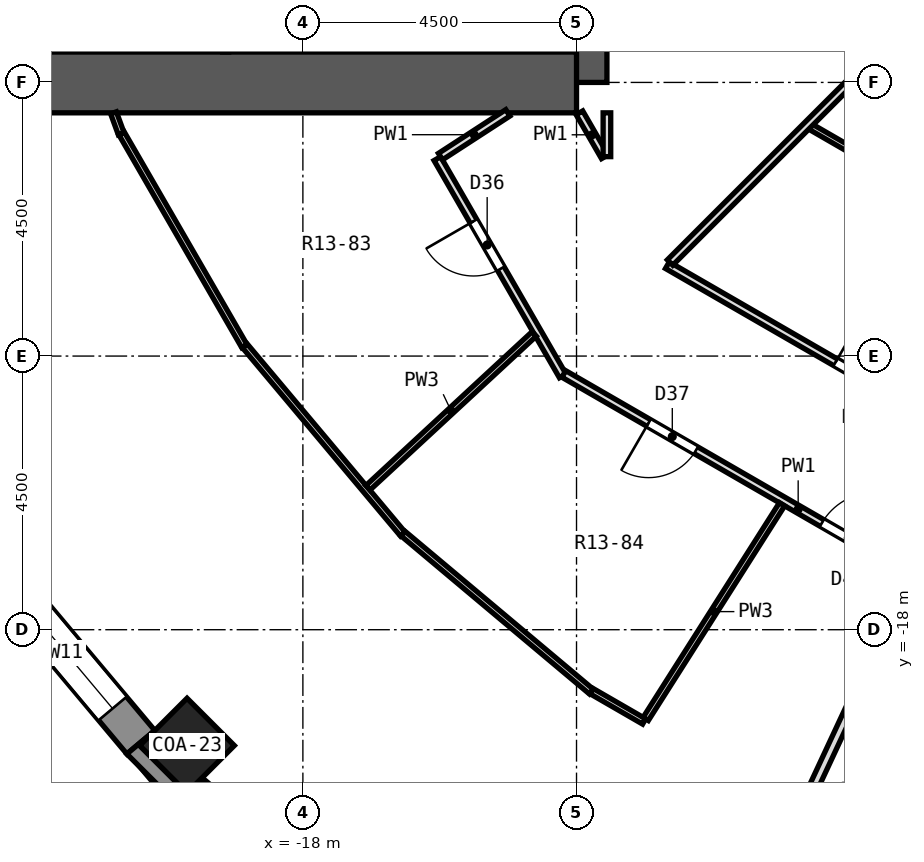
"""IFC4 building model, lengths in metres.
Left out: names, types, materials, properties, quantities, classifications, styles, units other than length and angle.
Written with IfcOpenShell. Run it as: python <this file> out.ifc"""

import sys

from ifc_helpers import new_model, si_unit, direction, frame, frame_2d, origin, origin_2d, place, context, subcontext, project, spatial, polyline, rectangle, outline, extrude, element, fill, save


model = new_model("IFC4")
c1 = context("Model", 3, precision=1e-05, world=origin(), true_north=direction((0.0, 1.0)))
c2 = subcontext(c1, "Body", "Model", "MODEL_VIEW")
j1 = project(units=[si_unit("LENGTHUNIT", "METRE"), si_unit("PLANEANGLEUNIT", "RADIAN")], contexts=[c1])
p1 = place(None, origin())
s1 = spatial("IfcSite", under=j1, at=p1, CompositionType="ELEMENT")
p2 = place(p1, origin())
s2 = spatial("IfcBuilding", under=s1, at=p2, CompositionType="ELEMENT")
p3 = place(p2, frame((0.0, 0.0, 65.9)))
s3 = spatial("IfcBuildingStorey", under=s2, at=p3, CompositionType="ELEMENT", Elevation=65.9)
p4 = place(p3, frame((-19.905, -19.905, 0.0), z_axis=(0.0, 0.0, 1.0), x_axis=(-0.707106781187, -0.707106781187, 0.0)))
e1 = element("IfcColumn", 1, at=p4, inside=s3, PredefinedType="COLUMN", context=c2, shape_type="SweptSolid", body=[
    extrude(rectangle(XDim=1.1, YDim=1.1, at=origin_2d()), origin(), (0.0, 0.0, 1.0), 3.3),
])
p5 = place(p3, frame((-13.5, -9.0, 0.0), z_axis=(0.0, 0.0, 1.0), x_axis=(0.0, 1.0, 0.0)))
e2 = element("IfcWall", 2, at=p5, inside=s3, PredefinedType="SHEAR", context=c2, shape_type="SweptSolid", body=[
    extrude(rectangle(XDim=18.0, YDim=1.0, at=frame_2d((9.0, 0.0))), origin(), (0.0, 0.0, 1.0), 3.3),
])
p6 = place(p5, frame((15.4, 0.0, 0.0)))
e3 = element("IfcOpeningElement", 3, at=p6, cuts=e2, PredefinedType="OPENING", context=c2, shape_type="SweptSolid", body=[
    extrude(rectangle(XDim=1.2, YDim=2.1, at=frame_2d((0.6, 1.05))), frame((0.0, 0.512, 0.0), z_axis=(0.0, -1.0, 0.0), x_axis=(1.0, 0.0, 0.0)), (0.0, 0.0, 1.0), 1.024),
])
p7 = place(p5, frame((1.4, 0.0, 0.0)))
e4 = element("IfcOpeningElement", 4, at=p7, cuts=e2, PredefinedType="OPENING", context=c2, shape_type="SweptSolid", body=[
    extrude(rectangle(XDim=1.2, YDim=2.1, at=frame_2d((0.6, 1.05))), frame((0.0, 0.512, 0.0), z_axis=(0.0, -1.0, 0.0), x_axis=(1.0, 0.0, 0.0)), (0.0, 0.0, 1.0), 1.024),
])
p8 = place(p5, frame((7.5, 0.0, 0.0)))
e5 = element("IfcOpeningElement", 5, at=p8, cuts=e2, PredefinedType="OPENING", context=c2, shape_type="SweptSolid", body=[
    extrude(rectangle(XDim=3.0, YDim=2.4, at=frame_2d((1.5, 1.2))), frame((0.0, 0.512, 0.0), z_axis=(0.0, -1.0, 0.0), x_axis=(1.0, 0.0, 0.0)), (0.0, 0.0, 1.0), 1.024),
])
p9 = place(p3, frame((-13.5, -9.0, 0.0), z_axis=(0.0, 0.0, 1.0), x_axis=(-1.0, 0.0, 0.0)))
e6 = element("IfcWall", 6, at=p9, inside=s3, PredefinedType="SHEAR", context=c2, shape_type="SweptSolid", body=[
    extrude(rectangle(XDim=12.4, YDim=1.0, at=frame_2d((6.2, 0.0))), origin(), (0.0, 0.0, 1.0), 3.3),
])
p10 = place(p3, frame((-23.137, -16.904, 0.0), z_axis=(0.0, 0.0, 1.0), x_axis=(0.642809392687, -0.766026164483, 0.0)))
e7 = element("IfcWall", 7, at=p10, inside=s3, PredefinedType="SOLIDWALL", context=c2, shape_type="SweptSolid", body=[
    extrude(rectangle(XDim=3.846, YDim=0.6, at=frame_2d((1.923, 0.0))), origin(), (0.0, 0.0, 1.0), 2.75),
])
p11 = place(p10, frame((0.723, 0.0, 0.9)))
e8 = element("IfcOpeningElement", 8, at=p11, cuts=e7, PredefinedType="OPENING", context=c2, shape_type="SweptSolid", body=[
    extrude(rectangle(XDim=2.4, YDim=1.8, at=frame_2d((1.2, 0.9))), frame((0.0, 0.312, 0.0), z_axis=(0.0, -1.0, 0.0), x_axis=(1.0, 0.0, 0.0)), (0.0, 0.0, 1.0), 0.624),
])
p12 = place(p3, frame((-19.85, -20.665, 0.0), z_axis=(0.0, 0.0, 1.0), x_axis=(0.766026164483, -0.642809392687, 0.0)))
e9 = element("IfcWall", 9, at=p12, inside=s3, PredefinedType="SOLIDWALL", context=c2, shape_type="SweptSolid", body=[
    extrude(rectangle(XDim=3.846, YDim=0.6, at=frame_2d((1.923, 0.0))), origin(), (0.0, 0.0, 1.0), 2.75),
])
p13 = place(p12, frame((0.723, 0.0, 0.9)))
e10 = element("IfcOpeningElement", 10, at=p13, cuts=e9, PredefinedType="OPENING", context=c2, shape_type="SweptSolid", body=[
    extrude(rectangle(XDim=2.4, YDim=1.8, at=frame_2d((1.2, 0.9))), frame((0.0, 0.312, 0.0), z_axis=(0.0, -1.0, 0.0), x_axis=(1.0, 0.0, 0.0)), (0.0, 0.0, 1.0), 0.624),
])
p14 = place(p3, origin())
e11 = element("IfcWall", 11, at=p14, inside=s3, PredefinedType="SOLIDWALL", context=c2, shape_type="SweptSolid", body=[
    extrude(outline(polyline([(-20.043, -20.895), (-19.657, -20.435), (-19.905, -20.683), (-20.683, -19.905), (-20.435, -19.657), (-20.895, -20.043), (-20.043, -20.895)])), origin(), (0.0, 0.0, 1.0), 2.75),
])
p15 = place(p3, frame((-21.114, -9.5, 0.0), z_axis=(0.0, 0.0, 1.0), x_axis=(0.34403955715, -0.938955155008, 0.0)))
e12 = element("IfcWall", 12, at=p15, inside=s3, PredefinedType="PARTITIONING", context=c2, shape_type="SweptSolid", body=[
    extrude(rectangle(XDim=0.367, YDim=0.1, at=frame_2d((0.184, 0.0))), origin(), (0.0, 0.0, 1.0), 2.75),
])
p16 = place(p3, frame((-20.98, -9.84, 0.0), z_axis=(0.0, 0.0, 1.0), x_axis=(0.500013722509, -0.866017480945, 0.0)))
e13 = element("IfcWall", 13, at=p16, inside=s3, PredefinedType="PARTITIONING", context=c2, shape_type="SweptSolid", body=[
    extrude(rectangle(XDim=4.039, YDim=0.1, at=frame_2d((2.02, 0.0))), origin(), (0.0, 0.0, 1.0), 2.75),
])
p17 = place(p3, frame((-15.789, -10.253, 0.0), z_axis=(0.0, 0.0, 1.0), x_axis=(0.49993934159, -0.866060422101, 0.0)))
e14 = element("IfcWall", 14, at=p17, inside=s3, PredefinedType="PARTITIONING", context=c2, shape_type="SweptSolid", body=[
    extrude(rectangle(XDim=4.125, YDim=0.125, at=frame_2d((2.062, 0.0))), origin(), (0.0, 0.0, 1.0), 2.75),
])
p18 = place(p17, frame((1.189, 0.0, 0.0)))
e15 = element("IfcOpeningElement", 15, at=p18, cuts=e14, PredefinedType="OPENING", context=c2, shape_type="SweptSolid", body=[
    extrude(rectangle(XDim=0.9, YDim=2.1, at=frame_2d((0.45, 1.05))), frame((0.0, 0.074, 0.0), z_axis=(0.0, -1.0, 0.0), x_axis=(1.0, 0.0, 0.0)), (0.0, 0.0, 1.0), 0.149),
])
p19 = place(p3, frame((-13.452, -9.5, 0.0), z_axis=(0.0, 0.0, 1.0), x_axis=(0.49991670217, -0.866073490468, 0.0)))
e16 = element("IfcWall", 16, at=p19, inside=s3, PredefinedType="PARTITIONING", context=c2, shape_type="SweptSolid", body=[
    extrude(rectangle(XDim=0.834, YDim=0.125, at=frame_2d((0.417, 0.0))), origin(), (0.0, 0.0, 1.0), 2.75),
])
p20 = place(p3, frame((-18.954, -13.332, 0.0), z_axis=(0.0, 0.0, 1.0), x_axis=(0.642759837919, -0.766067745541, 0.0)))
e17 = element("IfcWall", 17, at=p20, inside=s3, PredefinedType="PARTITIONING", context=c2, shape_type="SweptSolid", body=[
    extrude(rectangle(XDim=4.041, YDim=0.1, at=frame_2d((2.021, 0.0))), origin(), (0.0, 0.0, 1.0), 2.75),
])
p21 = place(p3, frame((-16.351, -16.421, 0.0), z_axis=(0.0, 0.0, 1.0), x_axis=(0.766042783762, -0.642789587226, 0.0)))
e18 = element("IfcWall", 18, at=p21, inside=s3, PredefinedType="PARTITIONING", context=c2, shape_type="SweptSolid", body=[
    extrude(rectangle(XDim=4.041, YDim=0.1, at=frame_2d((2.021, 0.0))), origin(), (0.0, 0.0, 1.0), 2.75),
])
p22 = place(p3, frame((-13.251, -19.011, 0.0), z_axis=(0.0, 0.0, 1.0), x_axis=(0.866063163075, -0.499934593286, 0.0)))
e19 = element("IfcWall", 19, at=p22, inside=s3, PredefinedType="PARTITIONING", context=c2, shape_type="SweptSolid", body=[
    extrude(rectangle(XDim=0.996, YDim=0.1, at=frame_2d((0.498, 0.0))), origin(), (0.0, 0.0, 1.0), 2.75),
])
p23 = place(p3, frame((-13.709, -13.794, 0.0), z_axis=(0.0, 0.0, 1.0), x_axis=(0.866059817553, -0.499940388867, 0.0)))
e20 = element("IfcWall", 20, at=p23, inside=s3, PredefinedType="PARTITIONING", context=c2, shape_type="SweptSolid", body=[
    extrude(rectangle(XDim=10.085, YDim=0.125, at=frame_2d((5.042, 0.0))), origin(), (0.0, 0.0, 1.0), 2.75),
])
p24 = place(p23, frame((1.61, 0.0, 0.0)))
e21 = element("IfcOpeningElement", 21, at=p24, cuts=e20, PredefinedType="OPENING", context=c2, shape_type="SweptSolid", body=[
    extrude(rectangle(XDim=0.9, YDim=2.1, at=frame_2d((0.45, 1.05))), frame((0.0, 0.074, 0.0), z_axis=(0.0, -1.0, 0.0), x_axis=(1.0, 0.0, 0.0)), (0.0, 0.0, 1.0), 0.149),
])
p25 = place(p23, frame((4.901, 0.0, 0.0)))
e22 = element("IfcOpeningElement", 22, at=p25, cuts=e20, PredefinedType="OPENING", context=c2, shape_type="SweptSolid", body=[
    extrude(rectangle(XDim=1.0, YDim=2.1, at=frame_2d((0.5, 1.05))), frame((0.0, 0.074, 0.0), z_axis=(0.0, -1.0, 0.0), x_axis=(1.0, 0.0, 0.0)), (0.0, 0.0, 1.0), 0.149),
])
p26 = place(p23, frame((7.816, 0.0, 0.0)))
e23 = element("IfcOpeningElement", 23, at=p26, cuts=e20, PredefinedType="OPENING", context=c2, shape_type="SweptSolid", body=[
    extrude(rectangle(XDim=1.0, YDim=2.1, at=frame_2d((0.5, 1.05))), frame((0.0, 0.074, 0.0), z_axis=(0.0, -1.0, 0.0), x_axis=(1.0, 0.0, 0.0)), (0.0, 0.0, 1.0), 0.149),
])
p27 = place(p3, frame((-12.006, -12.006, 0.0), z_axis=(0.0, 0.0, 1.0), x_axis=(0.866073188118, -0.499917225971, 0.0)))
e24 = element("IfcWall", 24, at=p27, inside=s3, PredefinedType="PARTITIONING", context=c2, shape_type="SweptSolid", body=[
    extrude(rectangle(XDim=8.861, YDim=0.125, at=frame_2d((4.431, 0.0))), origin(), (0.0, 0.0, 1.0), 2.75),
])
p28 = place(p27, frame((3.193, 0.0, 0.0)))
e25 = element("IfcOpeningElement", 25, at=p28, cuts=e24, PredefinedType="OPENING", context=c2, shape_type="SweptSolid", body=[
    extrude(rectangle(XDim=0.9, YDim=2.1, at=frame_2d((0.45, 1.05))), frame((0.0, 0.074, 0.0), z_axis=(0.0, -1.0, 0.0), x_axis=(1.0, 0.0, 0.0)), (0.0, 0.0, 1.0), 0.149),
])
p29 = place(p3, frame((-9.646, -9.731, 0.0), z_axis=(0.0, 0.0, 1.0), x_axis=(0.866059669785, -0.49994064485, 0.0)))
e26 = element("IfcWall", 26, at=p29, inside=s3, PredefinedType="PARTITIONING", context=c2, shape_type="SweptSolid", body=[
    extrude(rectangle(XDim=7.038, YDim=0.1, at=frame_2d((3.519, 0.0))), origin(), (0.0, 0.0, 1.0), 2.75),
])
p30 = place(p29, frame((3.038, 0.0, 0.0)))
e27 = element("IfcOpeningElement", 27, at=p30, cuts=e26, PredefinedType="OPENING", context=c2, shape_type="SweptSolid", body=[
    extrude(rectangle(XDim=0.9, YDim=2.1, at=frame_2d((0.45, 1.05))), frame((0.0, 0.062, 0.0), z_axis=(0.0, -1.0, 0.0), x_axis=(1.0, 0.0, 0.0)), (0.0, 0.0, 1.0), 0.124),
])
p31 = place(p3, frame((-15.737, -10.219, 0.0), z_axis=(0.0, 0.0, 1.0), x_axis=(0.838785586694, 0.544461880717, 0.0)))
e28 = element("IfcWall", 28, at=p31, inside=s3, PredefinedType="PARTITIONING", context=c2, shape_type="SweptSolid", body=[
    extrude(rectangle(XDim=1.321, YDim=0.125, at=frame_2d((0.66, 0.0))), origin(), (0.0, 0.0, 1.0), 2.75),
])
p32 = place(p3, frame((-16.93, -15.666, 0.0), z_axis=(0.0, 0.0, 1.0), x_axis=(0.733966319228, 0.679185867226, 0.0)))
e29 = element("IfcWall", 29, at=p32, inside=s3, PredefinedType="PARTITIONING", context=c2, shape_type="SweptSolid", body=[
    extrude(rectangle(XDim=3.726, YDim=0.1, at=frame_2d((1.863, 0.0))), origin(), (0.0, 0.0, 1.0), 2.75),
])
p33 = place(p3, frame((-11.962, -11.962, 0.0), z_axis=(0.0, 0.0, 1.0), x_axis=(0.707106781187, 0.707106781187, 0.0)))
e30 = element("IfcWall", 30, at=p33, inside=s3, PredefinedType="PARTITIONING", context=c2, shape_type="SweptSolid", body=[
    extrude(rectangle(XDim=7.324, YDim=0.125, at=frame_2d((3.662, 0.0))), origin(), (0.0, 0.0, 1.0), 2.75),
])
p34 = place(p3, frame((-12.361, -19.467, 0.0), z_axis=(0.0, 0.0, 1.0), x_axis=(0.535975761714, 0.844233369901, 0.0)))
e31 = element("IfcWall", 31, at=p34, inside=s3, PredefinedType="PARTITIONING", context=c2, shape_type="SweptSolid", body=[
    extrude(rectangle(XDim=4.18, YDim=0.1, at=frame_2d((2.09, 0.0))), origin(), (0.0, 0.0, 1.0), 2.75),
])
p35 = place(p3, frame((-11.659, -25.006, 0.0), z_axis=(0.0, 0.0, 1.0), x_axis=(0.422344925588, 0.906435195604, 0.0)))
e32 = element("IfcWall", 32, at=p35, inside=s3, PredefinedType="PARTITIONING", context=c2, shape_type="SweptSolid", body=[
    extrude(rectangle(XDim=8.655, YDim=0.15, at=frame_2d((4.328, 0.0))), origin(), (0.0, 0.0, 1.0), 2.75),
])
p36 = place(p3, frame((-13.0, -10.22, 0.0), z_axis=(0.0, 0.0, 1.0), x_axis=(0.0, 1.0, 0.0)))
e33 = element("IfcWall", 33, at=p36, inside=s3, PredefinedType="PARTITIONING", context=c2, shape_type="SweptSolid", body=[
    extrude(rectangle(XDim=0.72, YDim=0.125, at=frame_2d((0.36, 0.0))), origin(), (0.0, 0.0, 1.0), 2.75),
])
p37 = place(p11, origin())
e34 = element("IfcWindow", 34, at=p37, inside=s3, PartitioningType="SINGLE_PANEL", PredefinedType="WINDOW", context=c2, shape_type="SweptSolid", body=[
    extrude(rectangle(XDim=2.4, YDim=1.8, at=frame_2d((1.2, 0.9))), frame((0.0, 0.18, 0.0), z_axis=(0.0, -1.0, 0.0), x_axis=(1.0, 0.0, 0.0)), (0.0, 0.0, 1.0), 0.06),
])
fill(e8, e34)
p38 = place(p18, frame((0.9, 0.0, 0.0), z_axis=(0.0, 0.0, 1.0), x_axis=(-1.0, 0.0, 0.0)))
e35 = element("IfcDoor", 35, at=p38, inside=s3, OperationType="SINGLE_SWING_RIGHT", PredefinedType="DOOR", context=c2, shape_type="SweptSolid", body=[
    extrude(rectangle(XDim=0.9, YDim=2.1, at=frame_2d((0.45, 1.05))), frame((0.0, 0.025, 0.0), z_axis=(0.0, -1.0, 0.0), x_axis=(1.0, 0.0, 0.0)), (0.0, 0.0, 1.0), 0.05),
])
fill(e15, e35)
p39 = place(p24, frame((0.9, 0.0, 0.0), z_axis=(0.0, 0.0, 1.0), x_axis=(-1.0, 0.0, 0.0)))
e36 = element("IfcDoor", 36, at=p39, inside=s3, OperationType="SINGLE_SWING_RIGHT", PredefinedType="DOOR", context=c2, shape_type="SweptSolid", body=[
    extrude(rectangle(XDim=0.9, YDim=2.1, at=frame_2d((0.45, 1.05))), frame((0.0, 0.025, 0.0), z_axis=(0.0, -1.0, 0.0), x_axis=(1.0, 0.0, 0.0)), (0.0, 0.0, 1.0), 0.05),
])
fill(e21, e36)
p40 = place(p28, origin())
e37 = element("IfcDoor", 37, at=p40, inside=s3, OperationType="SINGLE_SWING_LEFT", PredefinedType="DOOR", context=c2, shape_type="SweptSolid", body=[
    extrude(rectangle(XDim=0.9, YDim=2.1, at=frame_2d((0.45, 1.05))), frame((0.0, 0.025, 0.0), z_axis=(0.0, -1.0, 0.0), x_axis=(1.0, 0.0, 0.0)), (0.0, 0.0, 1.0), 0.05),
])
fill(e25, e37)
p41 = place(p25, origin())
e38 = element("IfcDoor", 38, at=p41, inside=s3, OperationType="SINGLE_SWING_RIGHT", PredefinedType="DOOR", context=c2, shape_type="SweptSolid", body=[
    extrude(rectangle(XDim=1.0, YDim=2.1, at=frame_2d((0.5, 1.05))), frame((0.0, 0.025, 0.0), z_axis=(0.0, -1.0, 0.0), x_axis=(1.0, 0.0, 0.0)), (0.0, 0.0, 1.0), 0.05),
])
fill(e22, e38)
save(model, sys.argv[1])
